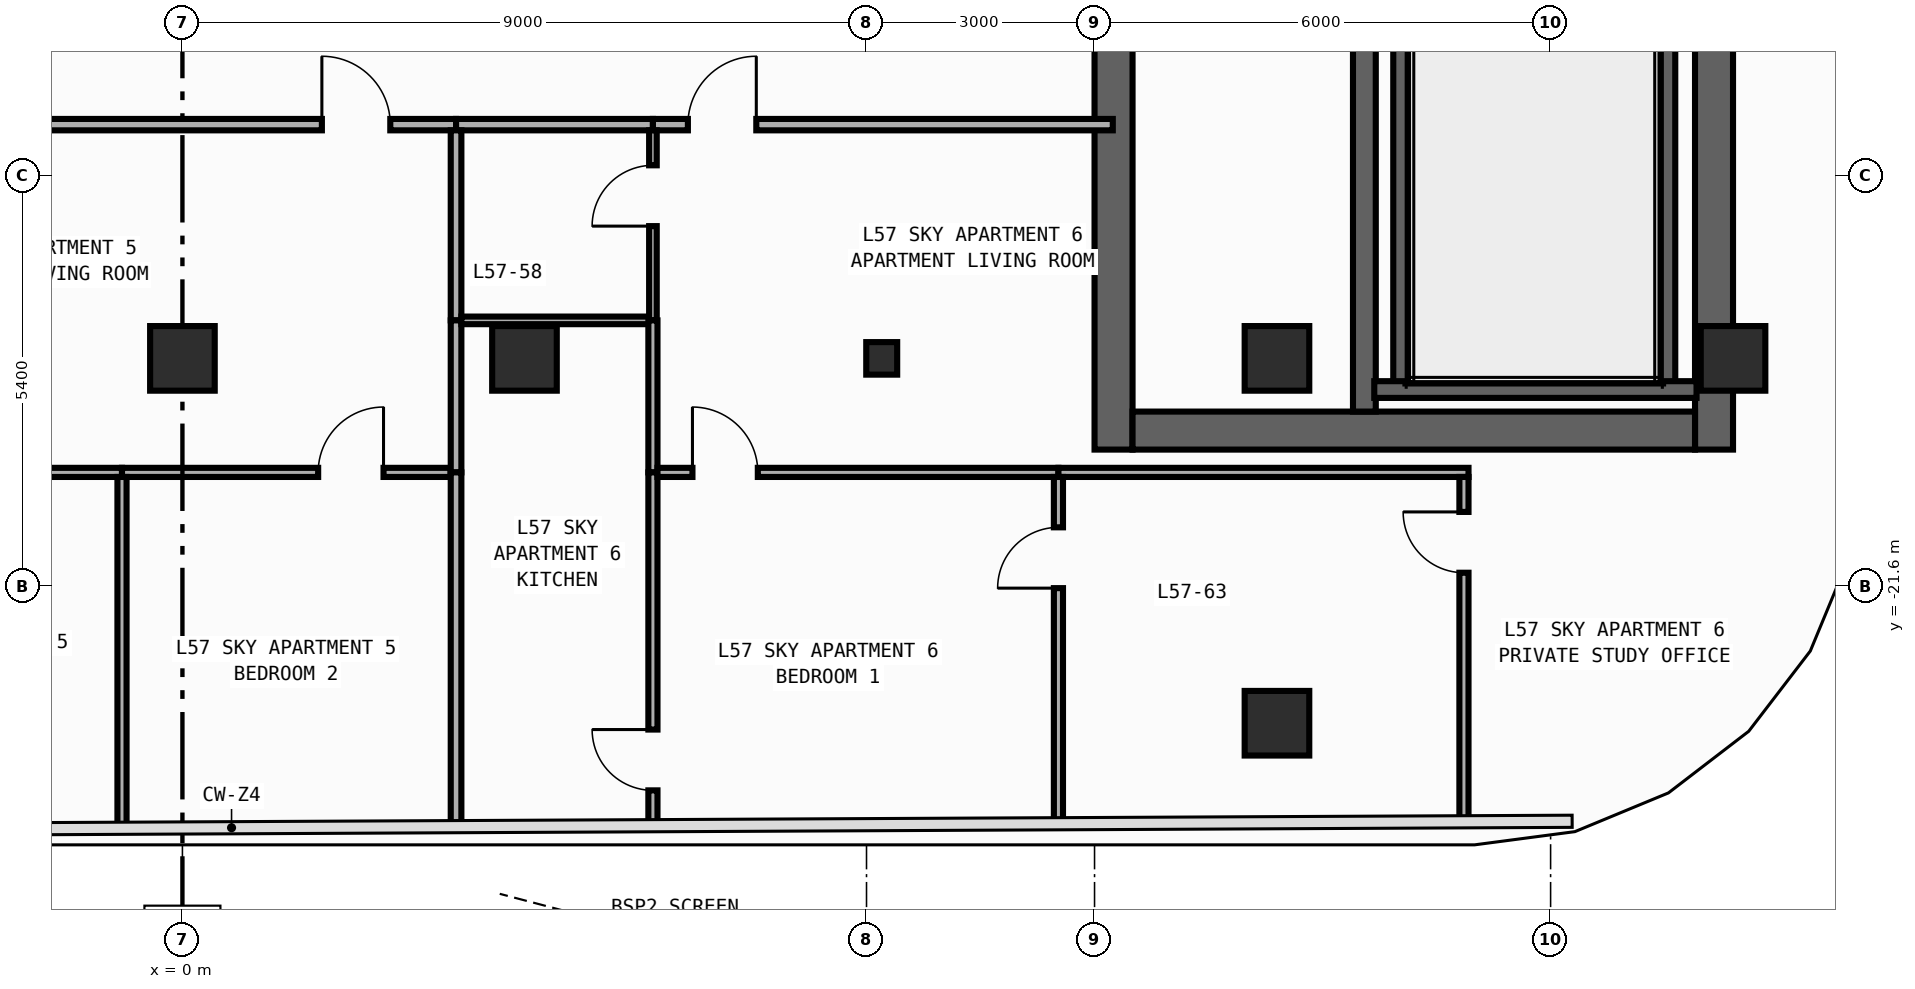
"""IFC4 building model, lengths in metres.
Left out: names, types, materials, properties, quantities, classifications, styles, units other than length and angle.
Written with IfcOpenShell. Run it as: python <this file> out.ifc"""

import sys

from ifc_helpers import new_model, si_unit, direction, frame, frame_2d, origin, origin_2d, place, context, subcontext, project, spatial, rectangle, i_section, extrude, element, fill, save


model = new_model("IFC4")
c1 = context("Model", 3, precision=1e-05, world=origin(), true_north=direction((0.0, 1.0)))
c2 = subcontext(c1, "Body", "Model", "MODEL_VIEW")
j1 = project(units=[si_unit("LENGTHUNIT", "METRE"), si_unit("PLANEANGLEUNIT", "RADIAN")], contexts=[c1])
p1 = place(None, origin())
s1 = spatial("IfcSite", under=j1, at=p1, CompositionType="ELEMENT")
p2 = place(p1, origin())
s2 = spatial("IfcBuilding", under=s1, at=p2, CompositionType="ELEMENT")
p3 = place(p2, frame((0.0, 0.0, 244.0)))
s3 = spatial("IfcBuildingStorey", under=s2, at=p3, CompositionType="ELEMENT", Elevation=244.0)
p4 = place(p3, frame((12.25, -19.8, 0.0), z_axis=(0.0, 0.0, 1.0), x_axis=(0.0, 1.0, 0.0)))
e1 = element("IfcWall", 1, at=p4, inside=s3, PredefinedType="SHEAR", context=c2, shape_type="SweptSolid", body=[
    extrude(rectangle(XDim=27.0, YDim=0.5, at=frame_2d((13.5, 0.0))), origin(), (0.0, 0.0, 1.0), 3.34),
])
p5 = place(p4, frame((23.05, 0.0, 0.0)))
e2 = element("IfcOpeningElement", 2, at=p5, cuts=e1, PredefinedType="OPENING", context=c2, shape_type="SweptSolid", body=[
    extrude(rectangle(XDim=1.1, YDim=2.2, at=frame_2d((0.55, 1.1))), frame((0.0, 0.26, 0.0), z_axis=(0.0, -1.0, 0.0), x_axis=(1.0, 0.0, 0.0)), (0.0, 0.0, 1.0), 0.52),
])
p6 = place(p4, frame((19.85, 0.0, 0.0)))
e3 = element("IfcOpeningElement", 3, at=p6, cuts=e1, PredefinedType="OPENING", context=c2, shape_type="SweptSolid", body=[
    extrude(rectangle(XDim=1.1, YDim=2.2, at=frame_2d((0.55, 1.1))), frame((0.0, 0.26, 0.0), z_axis=(0.0, -1.0, 0.0), x_axis=(1.0, 0.0, 0.0)), (0.0, 0.0, 1.0), 0.52),
])
p7 = place(p4, frame((16.65, 0.0, 0.0)))
e4 = element("IfcOpeningElement", 4, at=p7, cuts=e1, PredefinedType="OPENING", context=c2, shape_type="SweptSolid", body=[
    extrude(rectangle(XDim=1.1, YDim=2.2, at=frame_2d((0.55, 1.1))), frame((0.0, 0.26, 0.0), z_axis=(0.0, -1.0, 0.0), x_axis=(1.0, 0.0, 0.0)), (0.0, 0.0, 1.0), 0.52),
])
p8 = place(p4, frame((10.175, 0.0, 0.0)))
e5 = element("IfcOpeningElement", 5, at=p8, cuts=e1, PredefinedType="OPENING", context=c2, shape_type="SweptSolid", body=[
    extrude(rectangle(XDim=0.85, YDim=2.1, at=frame_2d((0.425, 1.05))), frame((0.0, 0.26, 0.0), z_axis=(0.0, -1.0, 0.0), x_axis=(1.0, 0.0, 0.0)), (0.0, 0.0, 1.0), 0.52),
])
p9 = place(p4, frame((12.725, 0.0, 0.0)))
e6 = element("IfcOpeningElement", 6, at=p9, cuts=e1, PredefinedType="OPENING", context=c2, shape_type="SweptSolid", body=[
    extrude(rectangle(XDim=1.15, YDim=2.2, at=frame_2d((0.575, 1.1))), frame((0.0, 0.26, 0.0), z_axis=(0.0, -1.0, 0.0), x_axis=(1.0, 0.0, 0.0)), (0.0, 0.0, 1.0), 0.52),
])
p10 = place(p4, frame((25.125, 0.0, 0.0)))
e7 = element("IfcOpeningElement", 7, at=p10, cuts=e1, PredefinedType="OPENING", context=c2, shape_type="SweptSolid", body=[
    extrude(rectangle(XDim=0.85, YDim=2.1, at=frame_2d((0.425, 1.05))), frame((0.0, 0.26, 0.0), z_axis=(0.0, -1.0, 0.0), x_axis=(1.0, 0.0, 0.0)), (0.0, 0.0, 1.0), 0.52),
])
p11 = place(p3, frame((20.15, -19.8, 0.0), z_axis=(0.0, 0.0, 1.0), x_axis=(0.0, 1.0, 0.0)))
e8 = element("IfcWall", 8, at=p11, inside=s3, PredefinedType="SHEAR", context=c2, shape_type="SweptSolid", body=[
    extrude(rectangle(XDim=27.0, YDim=0.5, at=frame_2d((13.5, 0.0))), origin(), (0.0, 0.0, 1.0), 3.34),
])
p12 = place(p3, frame((12.5, -19.55, 0.0), z_axis=(0.0, 0.0, 1.0), x_axis=(1.0, 0.0, 0.0)))
e9 = element("IfcWall", 9, at=p12, inside=s3, PredefinedType="SHEAR", context=c2, shape_type="SweptSolid", body=[
    extrude(rectangle(XDim=7.4, YDim=0.5, at=frame_2d((3.7, 0.0))), origin(), (0.0, 0.0, 1.0), 3.34),
])
p13 = place(p3, frame((15.55, -19.3, 0.0), z_axis=(0.0, 0.0, 1.0), x_axis=(0.0, 1.0, 0.0)))
e10 = element("IfcWall", 10, at=p13, inside=s3, PredefinedType="SHEAR", context=c2, shape_type="SweptSolid", body=[
    extrude(rectangle(XDim=26.0, YDim=0.3, at=frame_2d((13.0, 0.0))), origin(), (0.0, 0.0, 1.0), 3.34),
])
p14 = place(p13, frame((12.225, 0.0, 0.0)))
e11 = element("IfcOpeningElement", 11, at=p14, cuts=e10, PredefinedType="OPENING", context=c2, shape_type="SweptSolid", body=[
    extrude(rectangle(XDim=1.15, YDim=2.2, at=frame_2d((0.575, 1.1))), frame((0.0, 0.16, 0.0), z_axis=(0.0, -1.0, 0.0), x_axis=(1.0, 0.0, 0.0)), (0.0, 0.0, 1.0), 0.32),
])
p15 = place(p13, frame((24.625, 0.0, 0.0)))
e12 = element("IfcOpeningElement", 12, at=p15, cuts=e10, PredefinedType="OPENING", context=c2, shape_type="SweptSolid", body=[
    extrude(rectangle(XDim=0.85, YDim=2.1, at=frame_2d((0.425, 1.05))), frame((0.0, 0.16, 0.0), z_axis=(0.0, -1.0, 0.0), x_axis=(1.0, 0.0, 0.0)), (0.0, 0.0, 1.0), 0.32),
])
for number, where, z_axis, x_axis in (
    (13, (16.04, -19.01, 0.0), (0.0, 0.0, 1.0), (0.0, 1.0, 0.0)),
    (14, (19.53, -19.01, 0.0), (0.0, 0.0, 1.0), (0.0, 1.0, 0.0)),
):
    element("IfcWall", number, at=place(p3, frame(where, z_axis=z_axis, x_axis=x_axis)), inside=s3, PredefinedType="SHEAR", context=c2, shape_type="SweptSolid", body=[
        extrude(rectangle(XDim=11.42, YDim=0.22, at=frame_2d((5.71, 0.0))), origin(), (0.0, 0.0, 1.0), 3.34),
    ])
p16 = place(p3, frame((15.68, -19.01, 0.0), z_axis=(0.0, 0.0, 1.0), x_axis=(1.0, 0.0, 0.0)))
e15 = element("IfcWall", 15, at=p16, inside=s3, PredefinedType="SHEAR", context=c2, shape_type="SweptSolid", body=[
    extrude(rectangle(XDim=4.24, YDim=0.22, at=frame_2d((2.12, 0.0))), origin(), (0.0, 0.0, 1.0), 3.34),
])
p17 = place(p3, frame((9.2, -18.6, 0.0), z_axis=(0.0, 0.0, 1.0), x_axis=(1.0, 0.0, 0.0)))
e16 = element("IfcColumn", 16, at=p17, inside=s3, PredefinedType="COLUMN", context=c2, shape_type="SweptSolid", body=[
    extrude(i_section(OverallWidth=0.407, OverallDepth=0.428, WebThickness=0.02, FlangeThickness=0.035, FilletRadius=0.022, at=origin_2d()), origin(), (0.0, 0.0, 1.0), 3.6),
])
for number, where, z_axis, x_axis in (
    (17, (20.4, -18.6, 0.0), (0.0, 0.0, 1.0), (1.0, 0.0, 0.0)),
    (18, (14.4, -18.6, 0.0), (0.0, 0.0, 1.0), (1.0, 0.0, 0.0)),
    (19, (0.0, -18.6, 0.0), (0.0, 0.0, 1.0), (1.0, 0.0, 0.0)),
    (20, (4.5, -18.6, 0.0), (0.0, 0.0, 1.0), (1.0, 0.0, 0.0)),
    (21, (14.4, -23.4, 0.0), (0.0, 0.0, 1.0), (1.0, 0.0, 0.0)),
):
    element("IfcColumn", number, at=place(p3, frame(where, z_axis=z_axis, x_axis=x_axis)), inside=s3, PredefinedType="COLUMN", context=c2, shape_type="SweptSolid", body=[
        extrude(rectangle(XDim=0.85, YDim=0.85, at=origin_2d()), origin(), (0.0, 0.0, 1.0), 3.6),
    ])
p18 = place(p3, frame((-5.11, -15.525, 0.0), z_axis=(0.0, 0.0, 1.0), x_axis=(1.0, 0.0, 0.0)))
e22 = element("IfcWall", 22, at=p18, inside=s3, PredefinedType="PARTITIONING", context=c2, shape_type="SweptSolid", body=[
    extrude(rectangle(XDim=8.71, YDim=0.15, at=frame_2d((4.355, 0.0))), origin(), (0.0, 0.0, 1.0), 3.34),
])
p19 = place(p18, frame((6.945, 0.0, 0.0)))
e23 = element("IfcOpeningElement", 23, at=p19, cuts=e22, PredefinedType="OPENING", context=c2, shape_type="SweptSolid", body=[
    extrude(rectangle(XDim=0.9, YDim=2.15, at=frame_2d((0.45, 1.075))), frame((0.0, 0.085, 0.0), z_axis=(0.0, -1.0, 0.0), x_axis=(1.0, 0.0, 0.0)), (0.0, 0.0, 1.0), 0.17),
])
p20 = place(p3, frame((3.6, -15.525, 0.0), z_axis=(0.0, 0.0, 1.0), x_axis=(1.0, 0.0, 0.0)))
e24 = element("IfcWall", 24, at=p20, inside=s3, PredefinedType="PARTITIONING", context=c2, shape_type="SweptSolid", body=[
    extrude(rectangle(XDim=2.59, YDim=0.15, at=frame_2d((1.295, 0.0))), origin(), (0.0, 0.0, 1.0), 3.34),
])
p21 = place(p3, frame((6.19, -15.525, 0.0), z_axis=(0.0, 0.0, 1.0), x_axis=(1.0, 0.0, 0.0)))
e25 = element("IfcWall", 25, at=p21, inside=s3, PredefinedType="PARTITIONING", context=c2, shape_type="SweptSolid", body=[
    extrude(rectangle(XDim=6.05, YDim=0.15, at=frame_2d((3.025, 0.0))), origin(), (0.0, 0.0, 1.0), 3.34),
])
p22 = place(p21, frame((0.46, 0.0, 0.0)))
e26 = element("IfcOpeningElement", 26, at=p22, cuts=e25, PredefinedType="OPENING", context=c2, shape_type="SweptSolid", body=[
    extrude(rectangle(XDim=0.9, YDim=2.15, at=frame_2d((0.45, 1.075))), frame((0.0, 0.085, 0.0), z_axis=(0.0, -1.0, 0.0), x_axis=(1.0, 0.0, 0.0)), (0.0, 0.0, 1.0), 0.17),
])
p23 = place(p3, frame((-5.05, -20.1, 0.0), z_axis=(0.0, 0.0, 1.0), x_axis=(1.0, 0.0, 0.0)))
e27 = element("IfcWall", 27, at=p23, inside=s3, PredefinedType="PARTITIONING", context=c2, shape_type="SweptSolid", body=[
    extrude(rectangle(XDim=4.255, YDim=0.12, at=frame_2d((2.127, 0.0))), origin(), (0.0, 0.0, 1.0), 3.34),
])
p24 = place(p23, frame((2.316, 0.0, 0.0)))
e28 = element("IfcOpeningElement", 28, at=p24, cuts=e27, PredefinedType="OPENING", context=c2, shape_type="SweptSolid", body=[
    extrude(rectangle(XDim=0.86, YDim=2.15, at=frame_2d((0.43, 1.075))), frame((0.0, 0.07, 0.0), z_axis=(0.0, -1.0, 0.0), x_axis=(1.0, 0.0, 0.0)), (0.0, 0.0, 1.0), 0.14),
])
p25 = place(p3, frame((-0.795, -20.1, 0.0), z_axis=(0.0, 0.0, 1.0), x_axis=(1.0, 0.0, 0.0)))
e29 = element("IfcWall", 29, at=p25, inside=s3, PredefinedType="PARTITIONING", context=c2, shape_type="SweptSolid", body=[
    extrude(rectangle(XDim=4.325, YDim=0.12, at=frame_2d((2.163, 0.0))), origin(), (0.0, 0.0, 1.0), 3.34),
])
p26 = place(p25, frame((2.581, 0.0, 0.0)))
e30 = element("IfcOpeningElement", 30, at=p26, cuts=e29, PredefinedType="OPENING", context=c2, shape_type="SweptSolid", body=[
    extrude(rectangle(XDim=0.86, YDim=2.15, at=frame_2d((0.43, 1.075))), frame((0.0, 0.07, 0.0), z_axis=(0.0, -1.0, 0.0), x_axis=(1.0, 0.0, 0.0)), (0.0, 0.0, 1.0), 0.14),
])
p27 = place(p3, frame((3.6, -18.1, 0.0), z_axis=(0.0, 0.0, 1.0), x_axis=(0.0, 1.0, 0.0)))
e31 = element("IfcWall", 31, at=p27, inside=s3, PredefinedType="PARTITIONING", context=c2, shape_type="SweptSolid", body=[
    extrude(rectangle(XDim=2.5, YDim=0.14, at=frame_2d((1.25, 0.0))), origin(), (0.0, 0.0, 1.0), 3.34),
])
p28 = place(p3, frame((3.6, -20.1, 0.0), z_axis=(0.0, 0.0, 1.0), x_axis=(0.0, 1.0, 0.0)))
e32 = element("IfcWall", 32, at=p28, inside=s3, PredefinedType="PARTITIONING", context=c2, shape_type="SweptSolid", body=[
    extrude(rectangle(XDim=2.0, YDim=0.14, at=frame_2d((1.0, 0.0))), origin(), (0.0, 0.0, 1.0), 3.34),
])
p29 = place(p3, frame((-0.795, -24.777, 0.0), z_axis=(0.0, 0.0, 1.0), x_axis=(0.0, 1.0, 0.0)))
e33 = element("IfcWall", 33, at=p29, inside=s3, PredefinedType="PARTITIONING", context=c2, shape_type="SweptSolid", body=[
    extrude(rectangle(XDim=4.617, YDim=0.12, at=frame_2d((2.309, 0.0))), origin(), (0.0, 0.0, 1.0), 3.34),
])
p30 = place(p3, frame((3.6, -24.756, 0.0), z_axis=(0.0, 0.0, 1.0), x_axis=(0.0, 1.0, 0.0)))
e34 = element("IfcWall", 34, at=p30, inside=s3, PredefinedType="PARTITIONING", context=c2, shape_type="SweptSolid", body=[
    extrude(rectangle(XDim=4.656, YDim=0.14, at=frame_2d((2.328, 0.0))), origin(), (0.0, 0.0, 1.0), 3.34),
])
p31 = place(p3, frame((3.67, -18.1, 0.0), z_axis=(0.0, 0.0, 1.0), x_axis=(1.0, 0.0, 0.0)))
e35 = element("IfcWall", 35, at=p31, inside=s3, PredefinedType="PARTITIONING", context=c2, shape_type="SweptSolid", body=[
    extrude(rectangle(XDim=2.47, YDim=0.1, at=frame_2d((1.235, 0.0))), origin(), (0.0, 0.0, 1.0), 3.34),
])
p32 = place(p3, frame((6.19, -18.1, 0.0), z_axis=(0.0, 0.0, 1.0), x_axis=(0.0, 1.0, 0.0)))
e36 = element("IfcWall", 36, at=p32, inside=s3, PredefinedType="PARTITIONING", context=c2, shape_type="SweptSolid", body=[
    extrude(rectangle(XDim=2.5, YDim=0.1, at=frame_2d((1.25, 0.0))), origin(), (0.0, 0.0, 1.0), 3.34),
])
p33 = place(p32, frame((1.24, 0.0, 0.0)))
e37 = element("IfcOpeningElement", 37, at=p33, cuts=e36, PredefinedType="OPENING", context=c2, shape_type="SweptSolid", body=[
    extrude(rectangle(XDim=0.8, YDim=2.1, at=frame_2d((0.4, 1.05))), frame((0.0, 0.06, 0.0), z_axis=(0.0, -1.0, 0.0), x_axis=(1.0, 0.0, 0.0)), (0.0, 0.0, 1.0), 0.12),
])
p34 = place(p3, frame((6.19, -20.1, 0.0), z_axis=(0.0, 0.0, 1.0), x_axis=(0.0, 1.0, 0.0)))
e38 = element("IfcWall", 38, at=p34, inside=s3, PredefinedType="PARTITIONING", context=c2, shape_type="SweptSolid", body=[
    extrude(rectangle(XDim=2.0, YDim=0.12, at=frame_2d((1.0, 0.0))), origin(), (0.0, 0.0, 1.0), 3.34),
])
p35 = place(p3, frame((6.19, -24.743, 0.0), z_axis=(0.0, 0.0, 1.0), x_axis=(0.0, 1.0, 0.0)))
e39 = element("IfcWall", 39, at=p35, inside=s3, PredefinedType="PARTITIONING", context=c2, shape_type="SweptSolid", body=[
    extrude(rectangle(XDim=4.643, YDim=0.12, at=frame_2d((2.322, 0.0))), origin(), (0.0, 0.0, 1.0), 3.34),
])
p36 = place(p35, frame((0.46, 0.0, 0.0)))
e40 = element("IfcOpeningElement", 40, at=p36, cuts=e39, PredefinedType="OPENING", context=c2, shape_type="SweptSolid", body=[
    extrude(rectangle(XDim=0.8, YDim=2.1, at=frame_2d((0.4, 1.05))), frame((0.0, 0.07, 0.0), z_axis=(0.0, -1.0, 0.0), x_axis=(1.0, 0.0, 0.0)), (0.0, 0.0, 1.0), 0.14),
])
p37 = place(p3, frame((6.25, -20.1, 0.0), z_axis=(0.0, 0.0, 1.0), x_axis=(1.0, 0.0, 0.0)))
e41 = element("IfcWall", 41, at=p37, inside=s3, PredefinedType="PARTITIONING", context=c2, shape_type="SweptSolid", body=[
    extrude(rectangle(XDim=5.275, YDim=0.12, at=frame_2d((2.637, 0.0))), origin(), (0.0, 0.0, 1.0), 3.34),
])
p38 = place(p37, frame((0.46, 0.0, 0.0)))
e42 = element("IfcOpeningElement", 42, at=p38, cuts=e41, PredefinedType="OPENING", context=c2, shape_type="SweptSolid", body=[
    extrude(rectangle(XDim=0.86, YDim=2.15, at=frame_2d((0.43, 1.075))), frame((0.0, 0.07, 0.0), z_axis=(0.0, -1.0, 0.0), x_axis=(1.0, 0.0, 0.0)), (0.0, 0.0, 1.0), 0.14),
])
p39 = place(p3, frame((11.525, -20.1, 0.0), z_axis=(0.0, 0.0, 1.0), x_axis=(1.0, 0.0, 0.0)))
e43 = element("IfcWall", 43, at=p39, inside=s3, PredefinedType="PARTITIONING", context=c2, shape_type="SweptSolid", body=[
    extrude(rectangle(XDim=5.395, YDim=0.12, at=frame_2d((2.698, 0.0))), origin(), (0.0, 0.0, 1.0), 3.34),
])
p40 = place(p3, frame((16.86, -24.692, 0.0), z_axis=(0.0, 0.0, 1.0), x_axis=(0.0, 1.0, 0.0)))
e44 = element("IfcWall", 44, at=p40, inside=s3, PredefinedType="PARTITIONING", context=c2, shape_type="SweptSolid", body=[
    extrude(rectangle(XDim=4.532, YDim=0.12, at=frame_2d((2.266, 0.0))), origin(), (0.0, 0.0, 1.0), 3.34),
])
p41 = place(p40, frame((3.272, 0.0, 0.0)))
e45 = element("IfcOpeningElement", 45, at=p41, cuts=e44, PredefinedType="OPENING", context=c2, shape_type="SweptSolid", body=[
    extrude(rectangle(XDim=0.8, YDim=2.1, at=frame_2d((0.4, 1.05))), frame((0.0, 0.07, 0.0), z_axis=(0.0, -1.0, 0.0), x_axis=(1.0, 0.0, 0.0)), (0.0, 0.0, 1.0), 0.14),
])
p42 = place(p3, frame((11.525, -24.717, 0.0), z_axis=(0.0, 0.0, 1.0), x_axis=(0.0, 1.0, 0.0)))
e46 = element("IfcWall", 46, at=p42, inside=s3, PredefinedType="PARTITIONING", context=c2, shape_type="SweptSolid", body=[
    extrude(rectangle(XDim=4.557, YDim=0.12, at=frame_2d((2.279, 0.0))), origin(), (0.0, 0.0, 1.0), 3.34),
])
p43 = place(p42, frame((3.095, 0.0, 0.0)))
e47 = element("IfcOpeningElement", 47, at=p43, cuts=e46, PredefinedType="OPENING", context=c2, shape_type="SweptSolid", body=[
    extrude(rectangle(XDim=0.8, YDim=2.1, at=frame_2d((0.4, 1.05))), frame((0.0, 0.07, 0.0), z_axis=(0.0, -1.0, 0.0), x_axis=(1.0, 0.0, 0.0)), (0.0, 0.0, 1.0), 0.14),
])
p44 = place(p19, origin())
e48 = element("IfcDoor", 48, at=p44, inside=s3, OperationType="SINGLE_SWING_LEFT", PredefinedType="DOOR", context=c2, shape_type="SweptSolid", body=[
    extrude(rectangle(XDim=0.9, YDim=2.15, at=frame_2d((0.45, 1.075))), frame((0.0, 0.025, 0.0), z_axis=(0.0, -1.0, 0.0), x_axis=(1.0, 0.0, 0.0)), (0.0, 0.0, 1.0), 0.05),
])
fill(e23, e48)
p45 = place(p22, origin())
e49 = element("IfcDoor", 49, at=p45, inside=s3, OperationType="SINGLE_SWING_RIGHT", PredefinedType="DOOR", context=c2, shape_type="SweptSolid", body=[
    extrude(rectangle(XDim=0.9, YDim=2.15, at=frame_2d((0.45, 1.075))), frame((0.0, 0.025, 0.0), z_axis=(0.0, -1.0, 0.0), x_axis=(1.0, 0.0, 0.0)), (0.0, 0.0, 1.0), 0.05),
])
fill(e26, e49)
p46 = place(p26, origin())
e50 = element("IfcDoor", 50, at=p46, inside=s3, OperationType="SINGLE_SWING_RIGHT", PredefinedType="DOOR", context=c2, shape_type="SweptSolid", body=[
    extrude(rectangle(XDim=0.86, YDim=2.15, at=frame_2d((0.43, 1.075))), frame((0.0, 0.025, 0.0), z_axis=(0.0, -1.0, 0.0), x_axis=(1.0, 0.0, 0.0)), (0.0, 0.0, 1.0), 0.05),
])
fill(e30, e50)
p47 = place(p33, origin())
e51 = element("IfcDoor", 51, at=p47, inside=s3, OperationType="SINGLE_SWING_LEFT", PredefinedType="DOOR", context=c2, shape_type="SweptSolid", body=[
    extrude(rectangle(XDim=0.8, YDim=2.1, at=frame_2d((0.4, 1.05))), frame((0.0, 0.025, 0.0), z_axis=(0.0, -1.0, 0.0), x_axis=(1.0, 0.0, 0.0)), (0.0, 0.0, 1.0), 0.05),
])
fill(e37, e51)
p48 = place(p38, origin())
e52 = element("IfcDoor", 52, at=p48, inside=s3, OperationType="SINGLE_SWING_LEFT", PredefinedType="DOOR", context=c2, shape_type="SweptSolid", body=[
    extrude(rectangle(XDim=0.86, YDim=2.15, at=frame_2d((0.43, 1.075))), frame((0.0, 0.025, 0.0), z_axis=(0.0, -1.0, 0.0), x_axis=(1.0, 0.0, 0.0)), (0.0, 0.0, 1.0), 0.05),
])
fill(e42, e52)
p49 = place(p36, origin())
e53 = element("IfcDoor", 53, at=p49, inside=s3, OperationType="SINGLE_SWING_RIGHT", PredefinedType="DOOR", context=c2, shape_type="SweptSolid", body=[
    extrude(rectangle(XDim=0.8, YDim=2.1, at=frame_2d((0.4, 1.05))), frame((0.0, 0.025, 0.0), z_axis=(0.0, -1.0, 0.0), x_axis=(1.0, 0.0, 0.0)), (0.0, 0.0, 1.0), 0.05),
])
fill(e40, e53)
p50 = place(p43, origin())
e54 = element("IfcDoor", 54, at=p50, inside=s3, OperationType="SINGLE_SWING_LEFT", PredefinedType="DOOR", context=c2, shape_type="SweptSolid", body=[
    extrude(rectangle(XDim=0.8, YDim=2.1, at=frame_2d((0.4, 1.05))), frame((0.0, 0.025, 0.0), z_axis=(0.0, -1.0, 0.0), x_axis=(1.0, 0.0, 0.0)), (0.0, 0.0, 1.0), 0.05),
])
fill(e47, e54)
p51 = place(p41, origin())
e55 = element("IfcDoor", 55, at=p51, inside=s3, OperationType="SINGLE_SWING_RIGHT", PredefinedType="DOOR", context=c2, shape_type="SweptSolid", body=[
    extrude(rectangle(XDim=0.8, YDim=2.1, at=frame_2d((0.4, 1.05))), frame((0.0, 0.025, 0.0), z_axis=(0.0, -1.0, 0.0), x_axis=(1.0, 0.0, 0.0)), (0.0, 0.0, 1.0), 0.05),
])
fill(e45, e55)
save(model, sys.argv[1])
